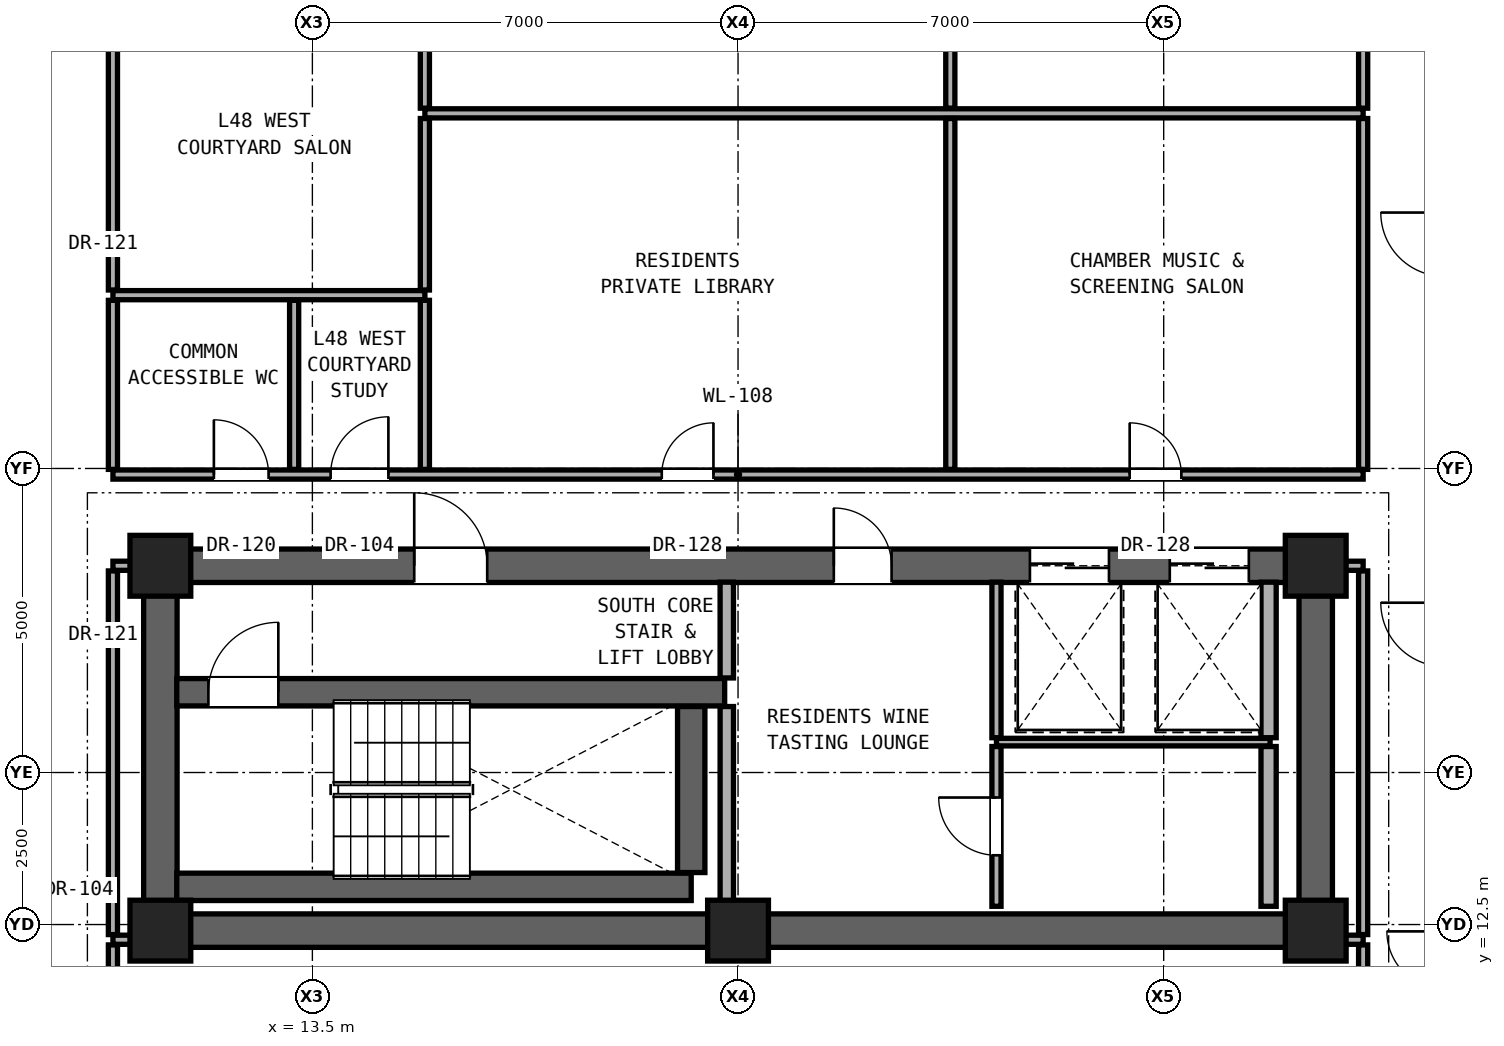
"""IFC4 building model, lengths in metres.
Left out: names, types, materials, properties, quantities, classifications, styles, units other than length and angle.
Written with IfcOpenShell. Run it as: python <this file> out.ifc"""

import sys

from ifc_helpers import new_model, si_unit, direction, frame, frame_2d, origin, origin_2d, place, context, subcontext, project, spatial, rectangle, extrude, element, fill, save


model = new_model("IFC4")
c1 = context("Model", 3, precision=1e-05, world=origin(), true_north=direction((0.0, 1.0)))
c2 = subcontext(c1, "Body", "Model", "MODEL_VIEW")
j1 = project(units=[si_unit("LENGTHUNIT", "METRE"), si_unit("PLANEANGLEUNIT", "RADIAN")], contexts=[c1])
p1 = place(None, origin())
s1 = spatial("IfcSite", under=j1, at=p1, CompositionType="ELEMENT")
p2 = place(p1, origin())
s2 = spatial("IfcBuilding", under=s1, at=p2, CompositionType="ELEMENT")
p3 = place(p2, frame((0.0, 0.0, 170.65)))
s3 = spatial("IfcBuildingStorey", under=s2, at=p3, CompositionType="ELEMENT", Elevation=170.65)
for number, where, z_axis, x_axis in (
    (1, (11.0, 12.4, 0.0), (0.0, 0.0, 1.0), (1.0, 0.0, 0.0)),
    (2, (20.5, 12.4, 0.0), (0.0, 0.0, 1.0), (1.0, 0.0, 0.0)),
    (3, (30.0, 12.4, 0.0), (0.0, 0.0, 1.0), (1.0, 0.0, 0.0)),
    (4, (11.0, 18.4, 0.0), (0.0, 0.0, 1.0), (1.0, 0.0, 0.0)),
    (5, (30.0, 18.4, 0.0), (0.0, 0.0, 1.0), (1.0, 0.0, 0.0)),
):
    element("IfcColumn", number, at=place(p3, frame(where, z_axis=z_axis, x_axis=x_axis)), inside=s3, PredefinedType="COLUMN", context=c2, shape_type="SweptSolid", body=[
        extrude(rectangle(XDim=1.0, YDim=1.0, at=origin_2d()), origin(), (0.0, 0.0, 1.0), 3.25),
    ])
p4 = place(p3, frame((11.0, 12.4, 0.0), z_axis=(0.0, 0.0, 1.0), x_axis=(1.0, 0.0, 0.0)))
e6 = element("IfcWall", 6, at=p4, inside=s3, PredefinedType="SHEAR", context=c2, shape_type="SweptSolid", body=[
    extrude(rectangle(XDim=19.0, YDim=0.55, at=frame_2d((9.5, 0.0))), origin(), (0.0, 0.0, 1.0), 3.05),
])
for number, where, z_axis, x_axis in (
    (7, (11.0, 12.4, 0.0), (0.0, 0.0, 1.0), (0.0, 1.0, 0.0)),
    (8, (30.0, 12.4, 0.0), (0.0, 0.0, 1.0), (0.0, 1.0, 0.0)),
):
    element("IfcWall", number, at=place(p3, frame(where, z_axis=z_axis, x_axis=x_axis)), inside=s3, PredefinedType="SHEAR", context=c2, shape_type="SweptSolid", body=[
        extrude(rectangle(XDim=6.0, YDim=0.55, at=frame_2d((3.0, 0.0))), origin(), (0.0, 0.0, 1.0), 3.05),
    ])
p5 = place(p3, frame((11.0, 18.4, 0.0), z_axis=(0.0, 0.0, 1.0), x_axis=(1.0, 0.0, 0.0)))
e9 = element("IfcWall", 9, at=p5, inside=s3, PredefinedType="SHEAR", context=c2, shape_type="SweptSolid", body=[
    extrude(rectangle(XDim=19.0, YDim=0.55, at=frame_2d((9.5, 0.0))), origin(), (0.0, 0.0, 1.0), 3.05),
])
p6 = place(p5, frame((4.175, 0.0, 0.0)))
e10 = element("IfcOpeningElement", 10, at=p6, cuts=e9, PredefinedType="OPENING", context=c2, shape_type="SweptSolid", body=[
    extrude(rectangle(XDim=1.2, YDim=2.25, at=frame_2d((0.6, 1.125))), frame((0.0, 0.285, 0.0), z_axis=(0.0, -1.0, 0.0), x_axis=(1.0, 0.0, 0.0)), (0.0, 0.0, 1.0), 0.57),
])
p7 = place(p5, frame((11.075, 0.0, 0.0)))
e11 = element("IfcOpeningElement", 11, at=p7, cuts=e9, PredefinedType="OPENING", context=c2, shape_type="SweptSolid", body=[
    extrude(rectangle(XDim=0.95, YDim=2.15, at=frame_2d((0.475, 1.075))), frame((0.0, 0.285, 0.0), z_axis=(0.0, -1.0, 0.0), x_axis=(1.0, 0.0, 0.0)), (0.0, 0.0, 1.0), 0.57),
])
p8 = place(p5, frame((14.3, 0.0, 0.0)))
e12 = element("IfcOpeningElement", 12, at=p8, cuts=e9, PredefinedType="OPENING", context=c2, shape_type="SweptSolid", body=[
    extrude(rectangle(XDim=1.3, YDim=2.3, at=frame_2d((0.65, 1.15))), frame((0.0, 0.285, 0.0), z_axis=(0.0, -1.0, 0.0), x_axis=(1.0, 0.0, 0.0)), (0.0, 0.0, 1.0), 0.57),
])
p9 = place(p5, frame((16.6, 0.0, 0.0)))
e13 = element("IfcOpeningElement", 13, at=p9, cuts=e9, PredefinedType="OPENING", context=c2, shape_type="SweptSolid", body=[
    extrude(rectangle(XDim=1.3, YDim=2.3, at=frame_2d((0.65, 1.15))), frame((0.0, 0.285, 0.0), z_axis=(0.0, -1.0, 0.0), x_axis=(1.0, 0.0, 0.0)), (0.0, 0.0, 1.0), 0.57),
])
for number, where, z_axis, x_axis in (
    (14, (10.22, 12.25, 0.0), (0.0, 0.0, 1.0), (1.0, 0.0, 0.0)),
    (15, (30.27, 12.25, 0.0), (0.0, 0.0, 1.0), (1.0, 0.0, 0.0)),
):
    element("IfcWall", number, at=place(p3, frame(where, z_axis=z_axis, x_axis=x_axis)), inside=s3, PredefinedType="PARTITIONING", context=c2, shape_type="SweptSolid", body=[
        extrude(rectangle(XDim=0.51, YDim=0.15, at=frame_2d((0.255, 0.0))), origin(), (0.0, 0.0, 1.0), 3.05),
    ])
p10 = place(p3, frame((11.27, 13.12, 0.0), z_axis=(0.0, 0.0, 1.0), x_axis=(1.0, 0.0, 0.0)))
e16 = element("IfcWall", 16, at=p10, inside=s3, PredefinedType="SHEAR", context=c2, shape_type="SweptSolid", body=[
    extrude(rectangle(XDim=8.46, YDim=0.45, at=frame_2d((4.23, 0.0))), origin(), (0.0, 0.0, 1.0), 3.05),
])
p11 = place(p3, frame((24.75, 15.5, 0.0), z_axis=(0.0, 0.0, 1.0), x_axis=(1.0, 0.0, 0.0)))
e17 = element("IfcWall", 17, at=p11, inside=s3, PredefinedType="PARTITIONING", context=c2, shape_type="SweptSolid", body=[
    extrude(rectangle(XDim=4.5, YDim=0.125, at=frame_2d((2.25, 0.0))), origin(), (0.0, 0.0, 1.0), 3.05),
])
p12 = place(p3, frame((11.27, 16.32, 0.0), z_axis=(0.0, 0.0, 1.0), x_axis=(1.0, 0.0, 0.0)))
e18 = element("IfcWall", 18, at=p12, inside=s3, PredefinedType="SHEAR", context=c2, shape_type="SweptSolid", body=[
    extrude(rectangle(XDim=9.01, YDim=0.45, at=frame_2d((4.505, 0.0))), origin(), (0.0, 0.0, 1.0), 3.05),
])
p13 = place(p12, frame((0.52, 0.0, 0.0)))
e19 = element("IfcOpeningElement", 19, at=p13, cuts=e18, PredefinedType="OPENING", context=c2, shape_type="SweptSolid", body=[
    extrude(rectangle(XDim=1.15, YDim=2.2, at=frame_2d((0.575, 1.1))), frame((0.0, 0.235, 0.0), z_axis=(0.0, -1.0, 0.0), x_axis=(1.0, 0.0, 0.0)), (0.0, 0.0, 1.0), 0.47),
])
for number, where, z_axis, x_axis in (
    (20, (10.22, 18.4, 0.0), (0.0, 0.0, 1.0), (1.0, 0.0, 0.0)),
    (21, (30.27, 18.4, 0.0), (0.0, 0.0, 1.0), (1.0, 0.0, 0.0)),
):
    element("IfcWall", number, at=place(p3, frame(where, z_axis=z_axis, x_axis=x_axis)), inside=s3, PredefinedType="PARTITIONING", context=c2, shape_type="SweptSolid", body=[
        extrude(rectangle(XDim=0.51, YDim=0.15, at=frame_2d((0.255, 0.0))), origin(), (0.0, 0.0, 1.0), 2.442),
    ])
p14 = place(p3, frame((10.22, 19.9, 0.0), z_axis=(0.0, 0.0, 1.0), x_axis=(1.0, 0.0, 0.0)))
e22 = element("IfcWall", 22, at=p14, inside=s3, PredefinedType="PARTITIONING", context=c2, shape_type="SweptSolid", body=[
    extrude(rectangle(XDim=20.56, YDim=0.15, at=frame_2d((10.28, 0.0))), origin(), (0.0, 0.0, 1.0), 2.186),
])
p15 = place(p14, frame((1.66, 0.0, 0.0)))
e23 = element("IfcOpeningElement", 23, at=p15, cuts=e22, PredefinedType="OPENING", context=c2, shape_type="SweptSolid", body=[
    extrude(rectangle(XDim=0.9, YDim=2.1, at=frame_2d((0.45, 1.05))), frame((0.0, 0.085, 0.0), z_axis=(0.0, -1.0, 0.0), x_axis=(1.0, 0.0, 0.0)), (0.0, 0.0, 1.0), 0.17),
])
p16 = place(p14, frame((3.58, 0.0, 0.0)))
e24 = element("IfcOpeningElement", 24, at=p16, cuts=e22, PredefinedType="OPENING", context=c2, shape_type="SweptSolid", body=[
    extrude(rectangle(XDim=0.95, YDim=2.15, at=frame_2d((0.475, 1.075))), frame((0.0, 0.085, 0.0), z_axis=(0.0, -1.0, 0.0), x_axis=(1.0, 0.0, 0.0)), (0.0, 0.0, 1.0), 0.17),
])
p17 = place(p14, frame((9.025, 0.0, 0.0)))
e25 = element("IfcOpeningElement", 25, at=p17, cuts=e22, PredefinedType="OPENING", context=c2, shape_type="SweptSolid", body=[
    extrude(rectangle(XDim=0.85, YDim=2.01, at=frame_2d((0.425, 1.005))), frame((0.0, 0.085, 0.0), z_axis=(0.0, -1.0, 0.0), x_axis=(1.0, 0.0, 0.0)), (0.0, 0.0, 1.0), 0.17),
])
p18 = place(p14, frame((16.72, 0.0, 0.0)))
e26 = element("IfcOpeningElement", 26, at=p18, cuts=e22, PredefinedType="OPENING", context=c2, shape_type="SweptSolid", body=[
    extrude(rectangle(XDim=0.85, YDim=2.01, at=frame_2d((0.425, 1.005))), frame((0.0, 0.085, 0.0), z_axis=(0.0, -1.0, 0.0), x_axis=(1.0, 0.0, 0.0)), (0.0, 0.0, 1.0), 0.17),
])
p19 = place(p3, frame((10.22, 22.85, 0.0), z_axis=(0.0, 0.0, 1.0), x_axis=(1.0, 0.0, 0.0)))
e27 = element("IfcWall", 27, at=p19, inside=s3, PredefinedType="PARTITIONING", context=c2, shape_type="SweptSolid", body=[
    extrude(rectangle(XDim=5.13, YDim=0.15, at=frame_2d((2.565, 0.0))), origin(), (0.0, 0.0, 1.0), 2.186),
])
p20 = place(p3, frame((15.35, 25.84, 0.0), z_axis=(0.0, 0.0, 1.0), x_axis=(1.0, 0.0, 0.0)))
e28 = element("IfcWall", 28, at=p20, inside=s3, PredefinedType="PARTITIONING", context=c2, shape_type="SweptSolid", body=[
    extrude(rectangle(XDim=15.43, YDim=0.15, at=frame_2d((7.715, 0.0))), origin(), (0.0, 0.0, 1.0), 2.186),
])
p21 = place(p3, frame((10.22, 9.34, 0.0), z_axis=(0.0, 0.0, 1.0), x_axis=(0.0, 1.0, 0.0)))
e29 = element("IfcWall", 29, at=p21, inside=s3, PredefinedType="PARTITIONING", context=c2, shape_type="SweptSolid", body=[
    extrude(rectangle(XDim=2.825, YDim=0.15, at=frame_2d((1.413, 0.0))), origin(), (0.0, 0.0, 1.0), 3.05),
])
p22 = place(p21, frame((0.887, 0.0, 0.0)))
e30 = element("IfcOpeningElement", 30, at=p22, cuts=e29, PredefinedType="OPENING", context=c2, shape_type="SweptSolid", body=[
    extrude(rectangle(XDim=1.05, YDim=2.2, at=frame_2d((0.525, 1.1))), frame((0.0, 0.085, 0.0), z_axis=(0.0, -1.0, 0.0), x_axis=(1.0, 0.0, 0.0)), (0.0, 0.0, 1.0), 0.17),
])
p23 = place(p3, frame((10.22, 12.335, 0.0), z_axis=(0.0, 0.0, 1.0), x_axis=(0.0, 1.0, 0.0)))
e31 = element("IfcWall", 31, at=p23, inside=s3, PredefinedType="PARTITIONING", context=c2, shape_type="SweptSolid", body=[
    extrude(rectangle(XDim=5.98, YDim=0.15, at=frame_2d((2.99, 0.0))), origin(), (0.0, 0.0, 1.0), 2.442),
])
p24 = place(p3, frame((10.22, 19.985, 0.0), z_axis=(0.0, 0.0, 1.0), x_axis=(0.0, 1.0, 0.0)))
e32 = element("IfcWall", 32, at=p24, inside=s3, PredefinedType="PARTITIONING", context=c2, shape_type="SweptSolid", body=[
    extrude(rectangle(XDim=2.78, YDim=0.15, at=frame_2d((1.39, 0.0))), origin(), (0.0, 0.0, 1.0), 3.05),
])
p25 = place(p3, frame((10.22, 22.935, 0.0), z_axis=(0.0, 0.0, 1.0), x_axis=(0.0, 1.0, 0.0)))
e33 = element("IfcWall", 33, at=p25, inside=s3, PredefinedType="PARTITIONING", context=c2, shape_type="SweptSolid", body=[
    extrude(rectangle(XDim=10.08, YDim=0.15, at=frame_2d((5.04, 0.0))), origin(), (0.0, 0.0, 1.0), 2.346),
])
p26 = place(p25, frame((4.565, 0.0, 0.0)))
e34 = element("IfcOpeningElement", 34, at=p26, cuts=e33, PredefinedType="OPENING", context=c2, shape_type="SweptSolid", body=[
    extrude(rectangle(XDim=0.95, YDim=2.15, at=frame_2d((0.475, 1.075))), frame((0.0, 0.085, 0.0), z_axis=(0.0, -1.0, 0.0), x_axis=(1.0, 0.0, 0.0)), (0.0, 0.0, 1.0), 0.17),
])
for number, where, z_axis, x_axis in (
    (35, (13.2, 19.985, 0.0), (0.0, 0.0, 1.0), (0.0, 1.0, 0.0)),
    (36, (15.35, 19.985, 0.0), (0.0, 0.0, 1.0), (0.0, 1.0, 0.0)),
):
    element("IfcWall", number, at=place(p3, frame(where, z_axis=z_axis, x_axis=x_axis)), inside=s3, PredefinedType="PARTITIONING", context=c2, shape_type="SweptSolid", body=[
        extrude(rectangle(XDim=2.78, YDim=0.15, at=frame_2d((1.39, 0.0))), origin(), (0.0, 0.0, 1.0), 3.05),
    ])
p27 = place(p3, frame((15.35, 22.935, 0.0), z_axis=(0.0, 0.0, 1.0), x_axis=(0.0, 1.0, 0.0)))
e37 = element("IfcWall", 37, at=p27, inside=s3, PredefinedType="PARTITIONING", context=c2, shape_type="SweptSolid", body=[
    extrude(rectangle(XDim=2.82, YDim=0.15, at=frame_2d((1.41, 0.0))), origin(), (0.0, 0.0, 1.0), 2.186),
])
p28 = place(p3, frame((15.35, 25.925, 0.0), z_axis=(0.0, 0.0, 1.0), x_axis=(0.0, 1.0, 0.0)))
e38 = element("IfcWall", 38, at=p28, inside=s3, PredefinedType="PARTITIONING", context=c2, shape_type="SweptSolid", body=[
    extrude(rectangle(XDim=7.09, YDim=0.15, at=frame_2d((3.545, 0.0))), origin(), (0.0, 0.0, 1.0), 2.186),
])
p29 = place(p3, frame((19.73, 13.355, 0.0), z_axis=(0.0, 0.0, 1.0), x_axis=(0.0, 1.0, 0.0)))
e39 = element("IfcWall", 39, at=p29, inside=s3, PredefinedType="SHEAR", context=c2, shape_type="SweptSolid", body=[
    extrude(rectangle(XDim=2.73, YDim=0.45, at=frame_2d((1.365, 0.0))), origin(), (0.0, 0.0, 1.0), 3.05),
])
p30 = place(p3, frame((20.315, 12.8, 0.0), z_axis=(0.0, 0.0, 1.0), x_axis=(0.0, 1.0, 0.0)))
e40 = element("IfcWall", 40, at=p30, inside=s3, PredefinedType="SOLIDWALL", context=c2, shape_type="SweptSolid", body=[
    extrude(rectangle(XDim=3.285, YDim=0.22, at=frame_2d((1.643, 0.0))), origin(), (0.0, 0.0, 1.0), 3.05),
])
p31 = place(p3, frame((20.315, 16.555, 0.0), z_axis=(0.0, 0.0, 1.0), x_axis=(0.0, 1.0, 0.0)))
e41 = element("IfcWall", 41, at=p31, inside=s3, PredefinedType="SOLIDWALL", context=c2, shape_type="SweptSolid", body=[
    extrude(rectangle(XDim=1.575, YDim=0.22, at=frame_2d((0.788, 0.0))), origin(), (0.0, 0.0, 1.0), 3.05),
])
p32 = place(p3, frame((23.991, 19.985, 0.0), z_axis=(0.0, 0.0, 1.0), x_axis=(0.0, 1.0, 0.0)))
e42 = element("IfcWall", 42, at=p32, inside=s3, PredefinedType="PARTITIONING", context=c2, shape_type="SweptSolid", body=[
    extrude(rectangle(XDim=5.77, YDim=0.15, at=frame_2d((2.885, 0.0))), origin(), (0.0, 0.0, 1.0), 2.186),
])
p33 = place(p3, frame((23.991, 25.925, 0.0), z_axis=(0.0, 0.0, 1.0), x_axis=(0.0, 1.0, 0.0)))
e43 = element("IfcWall", 43, at=p33, inside=s3, PredefinedType="PARTITIONING", context=c2, shape_type="SweptSolid", body=[
    extrude(rectangle(XDim=7.09, YDim=0.15, at=frame_2d((3.545, 0.0))), origin(), (0.0, 0.0, 1.0), 2.186),
])
p34 = place(p3, frame((24.75, 12.8, 0.0), z_axis=(0.0, 0.0, 1.0), x_axis=(0.0, 1.0, 0.0)))
e44 = element("IfcWall", 44, at=p34, inside=s3, PredefinedType="PARTITIONING", context=c2, shape_type="SweptSolid", body=[
    extrude(rectangle(XDim=2.627, YDim=0.15, at=frame_2d((1.314, 0.0))), origin(), (0.0, 0.0, 1.0), 3.05),
])
p35 = place(p34, frame((0.839, 0.0, 0.0)))
e45 = element("IfcOpeningElement", 45, at=p35, cuts=e44, PredefinedType="OPENING", context=c2, shape_type="SweptSolid", body=[
    extrude(rectangle(XDim=0.95, YDim=2.15, at=frame_2d((0.475, 1.075))), frame((0.0, 0.085, 0.0), z_axis=(0.0, -1.0, 0.0), x_axis=(1.0, 0.0, 0.0)), (0.0, 0.0, 1.0), 0.17),
])
p36 = place(p3, frame((24.75, 15.573, 0.0), z_axis=(0.0, 0.0, 1.0), x_axis=(0.0, 1.0, 0.0)))
e46 = element("IfcWall", 46, at=p36, inside=s3, PredefinedType="PARTITIONING", context=c2, shape_type="SweptSolid", body=[
    extrude(rectangle(XDim=2.557, YDim=0.15, at=frame_2d((1.279, 0.0))), origin(), (0.0, 0.0, 1.0), 3.05),
])
p37 = place(p3, frame((29.225, 12.8, 0.0), z_axis=(0.0, 0.0, 1.0), x_axis=(0.0, 1.0, 0.0)))
e47 = element("IfcWall", 47, at=p37, inside=s3, PredefinedType="SOLIDWALL", context=c2, shape_type="SweptSolid", body=[
    extrude(rectangle(XDim=2.627, YDim=0.25, at=frame_2d((1.314, 0.0))), origin(), (0.0, 0.0, 1.0), 3.05),
])
p38 = place(p3, frame((29.225, 15.573, 0.0), z_axis=(0.0, 0.0, 1.0), x_axis=(0.0, 1.0, 0.0)))
e48 = element("IfcWall", 48, at=p38, inside=s3, PredefinedType="SOLIDWALL", context=c2, shape_type="SweptSolid", body=[
    extrude(rectangle(XDim=2.557, YDim=0.25, at=frame_2d((1.279, 0.0))), origin(), (0.0, 0.0, 1.0), 3.05),
])
p39 = place(p3, frame((30.78, 9.34, 0.0), z_axis=(0.0, 0.0, 1.0), x_axis=(0.0, 1.0, 0.0)))
e49 = element("IfcWall", 49, at=p39, inside=s3, PredefinedType="PARTITIONING", context=c2, shape_type="SweptSolid", body=[
    extrude(rectangle(XDim=2.825, YDim=0.15, at=frame_2d((1.413, 0.0))), origin(), (0.0, 0.0, 1.0), 3.05),
])
p40 = place(p3, frame((30.78, 12.335, 0.0), z_axis=(0.0, 0.0, 1.0), x_axis=(0.0, 1.0, 0.0)))
e50 = element("IfcWall", 50, at=p40, inside=s3, PredefinedType="PARTITIONING", context=c2, shape_type="SweptSolid", body=[
    extrude(rectangle(XDim=5.98, YDim=0.15, at=frame_2d((2.99, 0.0))), origin(), (0.0, 0.0, 1.0), 2.442),
])
p41 = place(p3, frame((30.78, 19.985, 0.0), z_axis=(0.0, 0.0, 1.0), x_axis=(0.0, 1.0, 0.0)))
e51 = element("IfcWall", 51, at=p41, inside=s3, PredefinedType="PARTITIONING", context=c2, shape_type="SweptSolid", body=[
    extrude(rectangle(XDim=5.77, YDim=0.15, at=frame_2d((2.885, 0.0))), origin(), (0.0, 0.0, 1.0), 2.346),
])
p42 = place(p3, frame((30.78, 25.925, 0.0), z_axis=(0.0, 0.0, 1.0), x_axis=(0.0, 1.0, 0.0)))
e52 = element("IfcWall", 52, at=p42, inside=s3, PredefinedType="PARTITIONING", context=c2, shape_type="SweptSolid", body=[
    extrude(rectangle(XDim=7.09, YDim=0.15, at=frame_2d((3.545, 0.0))), origin(), (0.0, 0.0, 1.0), 2.346),
])
p43 = place(p6, origin())
e53 = element("IfcDoor", 53, at=p43, inside=s3, OperationType="SINGLE_SWING_LEFT", PredefinedType="DOOR", context=c2, shape_type="SweptSolid", body=[
    extrude(rectangle(XDim=1.2, YDim=2.25, at=frame_2d((0.6, 1.125))), frame((0.0, 0.025, 0.0), z_axis=(0.0, -1.0, 0.0), x_axis=(1.0, 0.0, 0.0)), (0.0, 0.0, 1.0), 0.05),
])
fill(e10, e53)
p44 = place(p13, origin())
e54 = element("IfcDoor", 54, at=p44, inside=s3, OperationType="SINGLE_SWING_RIGHT", PredefinedType="DOOR", context=c2, shape_type="SweptSolid", body=[
    extrude(rectangle(XDim=1.15, YDim=2.2, at=frame_2d((0.575, 1.1))), frame((0.0, 0.025, 0.0), z_axis=(0.0, -1.0, 0.0), x_axis=(1.0, 0.0, 0.0)), (0.0, 0.0, 1.0), 0.05),
])
fill(e19, e54)
p45 = place(p7, origin())
e55 = element("IfcDoor", 55, at=p45, inside=s3, OperationType="SINGLE_SWING_LEFT", PredefinedType="DOOR", context=c2, shape_type="SweptSolid", body=[
    extrude(rectangle(XDim=0.95, YDim=2.15, at=frame_2d((0.475, 1.075))), frame((0.0, 0.025, 0.0), z_axis=(0.0, -1.0, 0.0), x_axis=(1.0, 0.0, 0.0)), (0.0, 0.0, 1.0), 0.05),
])
fill(e11, e55)
p46 = place(p35, origin())
e56 = element("IfcDoor", 56, at=p46, inside=s3, OperationType="SINGLE_SWING_RIGHT", PredefinedType="DOOR", context=c2, shape_type="SweptSolid", body=[
    extrude(rectangle(XDim=0.95, YDim=2.15, at=frame_2d((0.475, 1.075))), frame((0.0, 0.025, 0.0), z_axis=(0.0, -1.0, 0.0), x_axis=(1.0, 0.0, 0.0)), (0.0, 0.0, 1.0), 0.05),
])
fill(e45, e56)
p47 = place(p15, origin())
e57 = element("IfcDoor", 57, at=p47, inside=s3, OperationType="SINGLE_SWING_LEFT", PredefinedType="DOOR", context=c2, shape_type="SweptSolid", body=[
    extrude(rectangle(XDim=0.9, YDim=2.1, at=frame_2d((0.45, 1.05))), frame((0.0, 0.025, 0.0), z_axis=(0.0, -1.0, 0.0), x_axis=(1.0, 0.0, 0.0)), (0.0, 0.0, 1.0), 0.05),
])
fill(e23, e57)
p48 = place(p16, origin())
e58 = element("IfcDoor", 58, at=p48, inside=s3, OperationType="SINGLE_SWING_RIGHT", PredefinedType="DOOR", context=c2, shape_type="SweptSolid", body=[
    extrude(rectangle(XDim=0.95, YDim=2.15, at=frame_2d((0.475, 1.075))), frame((0.0, 0.025, 0.0), z_axis=(0.0, -1.0, 0.0), x_axis=(1.0, 0.0, 0.0)), (0.0, 0.0, 1.0), 0.05),
])
fill(e24, e58)
p49 = place(p17, origin())
e59 = element("IfcDoor", 59, at=p49, inside=s3, OperationType="SINGLE_SWING_RIGHT", PredefinedType="DOOR", context=c2, shape_type="SweptSolid", body=[
    extrude(rectangle(XDim=0.85, YDim=2.01, at=frame_2d((0.425, 1.005))), frame((0.0, 0.025, 0.0), z_axis=(0.0, -1.0, 0.0), x_axis=(1.0, 0.0, 0.0)), (0.0, 0.0, 1.0), 0.05),
])
fill(e25, e59)
p50 = place(p18, origin())
e60 = element("IfcDoor", 60, at=p50, inside=s3, OperationType="SINGLE_SWING_LEFT", PredefinedType="DOOR", context=c2, shape_type="SweptSolid", body=[
    extrude(rectangle(XDim=0.85, YDim=2.01, at=frame_2d((0.425, 1.005))), frame((0.0, 0.025, 0.0), z_axis=(0.0, -1.0, 0.0), x_axis=(1.0, 0.0, 0.0)), (0.0, 0.0, 1.0), 0.05),
])
fill(e26, e60)
p51 = place(p8, origin())
e61 = element("IfcDoor", 61, at=p51, inside=s3, OperationType="DOUBLE_DOOR_SLIDING", PredefinedType="DOOR", context=c2, shape_type="SweptSolid", body=[
    extrude(rectangle(XDim=1.3, YDim=2.3, at=frame_2d((0.65, 1.15))), frame((0.0, 0.025, 0.0), z_axis=(0.0, -1.0, 0.0), x_axis=(1.0, 0.0, 0.0)), (0.0, 0.0, 1.0), 0.05),
])
fill(e12, e61)
p52 = place(p9, origin())
e62 = element("IfcDoor", 62, at=p52, inside=s3, OperationType="DOUBLE_DOOR_SLIDING", PredefinedType="DOOR", context=c2, shape_type="SweptSolid", body=[
    extrude(rectangle(XDim=1.3, YDim=2.3, at=frame_2d((0.65, 1.15))), frame((0.0, 0.025, 0.0), z_axis=(0.0, -1.0, 0.0), x_axis=(1.0, 0.0, 0.0)), (0.0, 0.0, 1.0), 0.05),
])
fill(e13, e62)
save(model, sys.argv[1])
